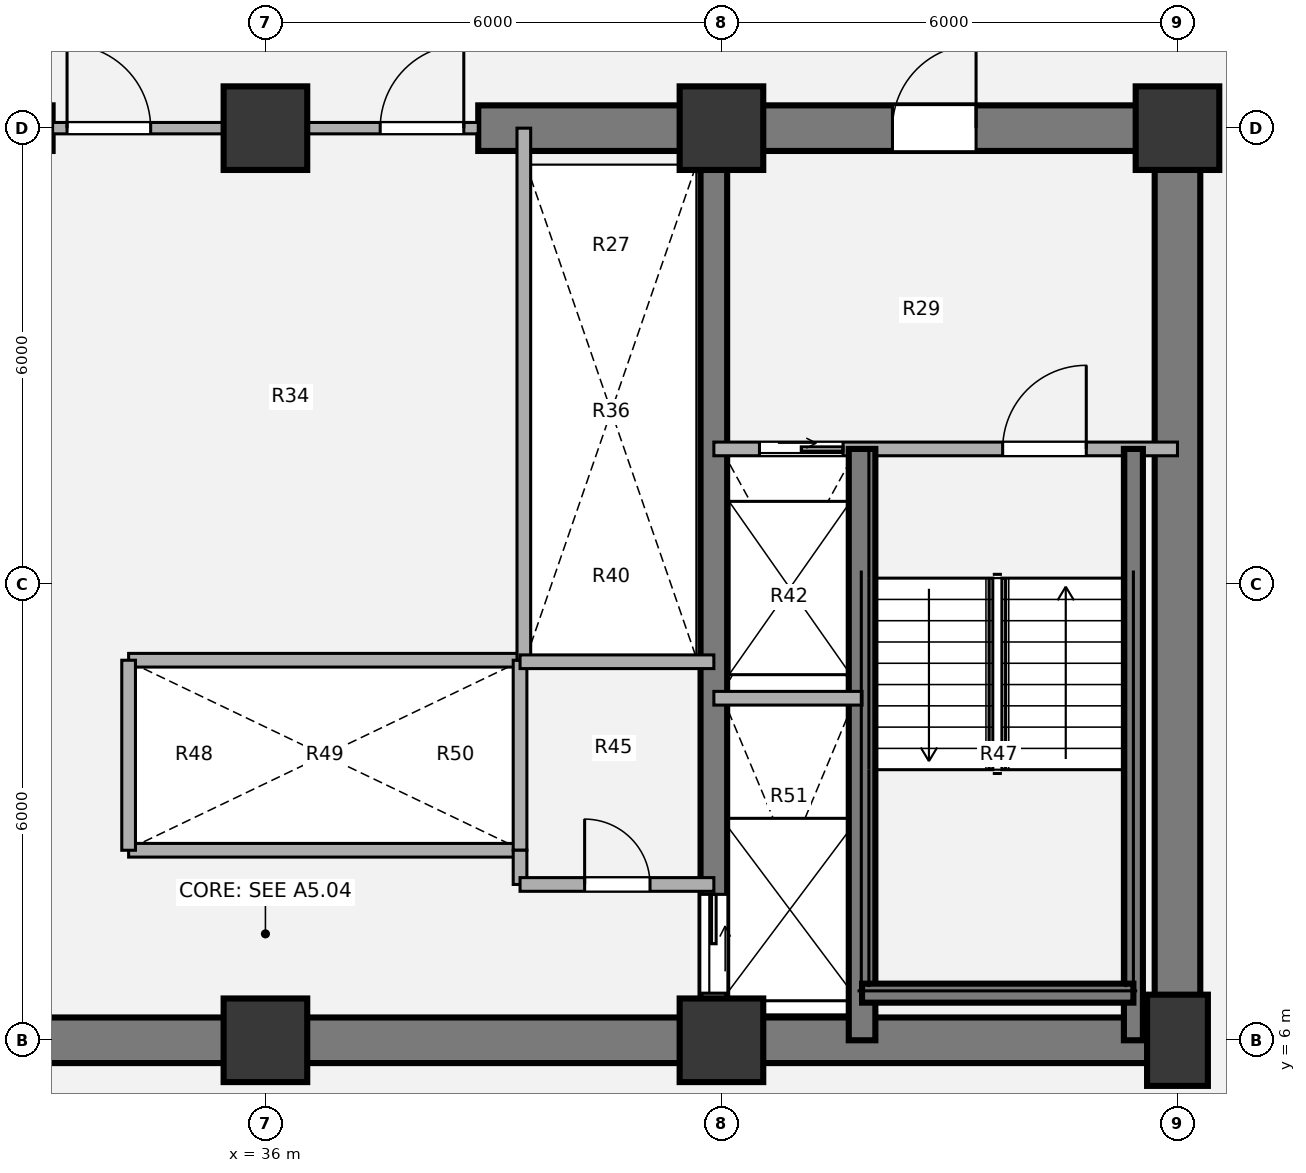
"""IFC4 building model, lengths in metres.
Left out: names, types, materials, properties, quantities, classifications, styles, units other than length and angle.
Written with IfcOpenShell. Run it as: python <this file> out.ifc"""

import sys

from ifc_helpers import new_model, si_unit, direction, frame, frame_2d, origin, origin_2d, place, context, subcontext, project, spatial, rectangle, extrude, source, transform, mapped, element, fill, save


model = new_model("IFC4")
c1 = context("Model", 3, precision=1e-05, world=origin(), true_north=direction((0.0, 1.0)))
c2 = subcontext(c1, "Body", "Model", "MODEL_VIEW")
j1 = project(units=[si_unit("LENGTHUNIT", "METRE"), si_unit("PLANEANGLEUNIT", "RADIAN")], contexts=[c1])
p1 = place(None, origin())
s1 = spatial("IfcSite", under=j1, at=p1, CompositionType="ELEMENT")
p2 = place(p1, origin())
s2 = spatial("IfcBuilding", under=s1, at=p2, CompositionType="ELEMENT")
p3 = place(p2, frame((0.0, 0.0, 34.56)))
s3 = spatial("IfcBuildingStorey", under=s2, at=p3, CompositionType="ELEMENT", Elevation=34.56)
m1 = source(origin(), c2, "Body", "SweptSolid", [
    extrude(rectangle(XDim=1.1, YDim=1.1, at=origin_2d()), origin(), (0.0, 0.0, 1.0), 3.78),
])
for number, where, z_axis, x_axis in (
    (1, (36.0, 6.0, 0.0), (0.0, 0.0, 1.0), (1.0, 0.0, 0.0)),
    (2, (42.0, 6.0, 0.0), (0.0, 0.0, 1.0), (1.0, 0.0, 0.0)),
):
    element("IfcColumn", number, at=place(p3, frame(where, z_axis=z_axis, x_axis=x_axis)), inside=s3, PredefinedType="COLUMN", context=c2, shape_type="MappedRepresentation", body=[
        mapped(m1, transform((0.0, 0.0, 0.0), x_axis=(1.0, 0.0, 0.0), y_axis=(0.0, 1.0, 0.0), z_axis=(0.0, 0.0, 1.0), scale=1.0)),
    ])
m2 = source(origin(), c2, "Body", "SweptSolid", [
    extrude(rectangle(XDim=0.8, YDim=1.2, at=origin_2d()), origin(), (0.0, 0.0, 1.0), 3.78),
])
p4 = place(p3, frame((48.0, 6.0, 0.0), z_axis=(0.0, 0.0, 1.0), x_axis=(1.0, 0.0, 0.0)))
e3 = element("IfcColumn", 3, at=p4, inside=s3, PredefinedType="COLUMN", context=c2, shape_type="MappedRepresentation", body=[
    mapped(m2, transform((0.0, 0.0, 0.0), x_axis=(1.0, 0.0, 0.0), y_axis=(0.0, 1.0, 0.0), z_axis=(0.0, 0.0, 1.0), scale=1.0)),
])
for number, where, z_axis, x_axis in (
    (4, (36.0, 18.0, 0.0), (0.0, 0.0, 1.0), (1.0, 0.0, 0.0)),
    (5, (42.0, 18.0, 0.0), (0.0, 0.0, 1.0), (1.0, 0.0, 0.0)),
    (6, (48.0, 18.0, 0.0), (0.0, 0.0, 1.0), (1.0, 0.0, 0.0)),
):
    element("IfcColumn", number, at=place(p3, frame(where, z_axis=z_axis, x_axis=x_axis)), inside=s3, PredefinedType="COLUMN", context=c2, shape_type="MappedRepresentation", body=[
        mapped(m1, transform((0.0, 0.0, 0.0), x_axis=(1.0, 0.0, 0.0), y_axis=(0.0, 1.0, 0.0), z_axis=(0.0, 0.0, 1.0), scale=1.0)),
    ])
p5 = place(p3, frame((48.3, 6.0, 0.0), z_axis=(0.0, 0.0, 1.0), x_axis=(-1.0, 0.0, 0.0)))
e7 = element("IfcWall", 7, at=p5, inside=s3, PredefinedType="SHEAR", context=c2, shape_type="SweptSolid", body=[
    extrude(rectangle(XDim=24.6, YDim=0.6, at=frame_2d((12.3, 0.0))), origin(), (0.0, 0.0, 1.0), 3.78),
])
p6 = place(p3, frame((48.0, 18.0, 0.0), z_axis=(0.0, 0.0, 1.0), x_axis=(0.0, -1.0, 0.0)))
e8 = element("IfcWall", 8, at=p6, inside=s3, PredefinedType="SHEAR", context=c2, shape_type="SweptSolid", body=[
    extrude(rectangle(XDim=12.0, YDim=0.6, at=frame_2d((6.0, 0.0))), origin(), (0.0, 0.0, 1.0), 3.78),
])
p7 = place(p3, frame((38.8, 18.0, 0.0), z_axis=(0.0, 0.0, 1.0), x_axis=(1.0, 0.0, 0.0)))
e9 = element("IfcWall", 9, at=p7, inside=s3, PredefinedType="SHEAR", context=c2, shape_type="SweptSolid", body=[
    extrude(rectangle(XDim=9.5, YDim=0.6, at=frame_2d((4.75, 0.0))), origin(), (0.0, 0.0, 1.0), 3.78),
])
p8 = place(p7, frame((5.45, 0.0, 0.0)))
e10 = element("IfcOpeningElement", 10, at=p8, cuts=e9, PredefinedType="OPENING", context=c2, shape_type="SweptSolid", body=[
    extrude(rectangle(XDim=1.1, YDim=2.1, at=origin_2d()), frame((0.55, 0.31, 1.05), z_axis=(0.0, -1.0, 0.0), x_axis=(1.0, 0.0, 0.0)), (0.0, 0.0, 1.0), 0.62),
])
p9 = place(p3, frame((41.9, 18.0, 0.0), z_axis=(0.0, 0.0, 1.0), x_axis=(0.0, -1.0, 0.0)))
e11 = element("IfcWall", 11, at=p9, inside=s3, PredefinedType="SHEAR", context=c2, shape_type="SweptSolid", body=[
    extrude(rectangle(XDim=12.0, YDim=0.35, at=frame_2d((6.0, 0.0))), origin(), (0.0, 0.0, 1.0), 3.78),
])
p10 = place(p9, frame((10.08, 0.0, 0.0)))
e12 = element("IfcOpeningElement", 12, at=p10, cuts=e11, PredefinedType="OPENING", context=c2, shape_type="SweptSolid", body=[
    extrude(rectangle(XDim=1.3, YDim=2.1, at=origin_2d()), frame((0.65, 0.185, 1.05), z_axis=(0.0, -1.0, 0.0), x_axis=(1.0, 0.0, 0.0)), (0.0, 0.0, 1.0), 0.37),
])
for number, where, z_axis, x_axis in (
    (13, (34.2, 11.0, 0.0), (0.0, 0.0, 1.0), (1.0, 0.0, 0.0)),
    (14, (34.2, 8.5, 0.0), (0.0, 0.0, 1.0), (1.0, 0.0, 0.0)),
):
    element("IfcWall", number, at=place(p3, frame(where, z_axis=z_axis, x_axis=x_axis)), inside=s3, PredefinedType="PARTITIONING", context=c2, shape_type="SweptSolid", body=[
        extrude(rectangle(XDim=5.15, YDim=0.18, at=frame_2d((2.575, 0.0))), origin(), (0.0, 0.0, 1.0), 3.5),
    ])
for number, where, z_axis, x_axis in (
    (15, (34.2, 8.5, 0.0), (0.0, 0.0, 1.0), (0.0, 1.0, 0.0)),
    (16, (39.35, 8.5, 0.0), (0.0, 0.0, 1.0), (0.0, 1.0, 0.0)),
):
    element("IfcWall", number, at=place(p3, frame(where, z_axis=z_axis, x_axis=x_axis)), inside=s3, PredefinedType="PARTITIONING", context=c2, shape_type="SweptSolid", body=[
        extrude(rectangle(XDim=2.5, YDim=0.18, at=frame_2d((1.25, 0.0))), origin(), (0.0, 0.0, 1.0), 3.5),
    ])
p11 = place(p3, frame((39.4, 11.0, 0.0), z_axis=(0.0, 0.0, 1.0), x_axis=(0.0, 1.0, 0.0)))
e17 = element("IfcWall", 17, at=p11, inside=s3, PredefinedType="PARTITIONING", context=c2, shape_type="SweptSolid", body=[
    extrude(rectangle(XDim=7.0, YDim=0.18, at=frame_2d((3.5, 0.0))), origin(), (0.0, 0.0, 1.0), 3.5),
])
p12 = place(p3, frame((39.35, 10.98, 0.0), z_axis=(0.0, 0.0, 1.0), x_axis=(1.0, 0.0, 0.0)))
e18 = element("IfcWall", 18, at=p12, inside=s3, PredefinedType="PARTITIONING", context=c2, shape_type="SweptSolid", body=[
    extrude(rectangle(XDim=2.55, YDim=0.18, at=frame_2d((1.275, 0.0))), origin(), (0.0, 0.0, 1.0), 3.5),
])
p13 = place(p3, frame((39.35, 8.05, 0.0), z_axis=(0.0, 0.0, 1.0), x_axis=(0.0, 1.0, 0.0)))
e19 = element("IfcWall", 19, at=p13, inside=s3, PredefinedType="PARTITIONING", context=c2, shape_type="SweptSolid", body=[
    extrude(rectangle(XDim=0.45, YDim=0.18, at=frame_2d((0.225, 0.0))), origin(), (0.0, 0.0, 1.0), 3.5),
])
p14 = place(p3, frame((39.35, 8.05, 0.0), z_axis=(0.0, 0.0, 1.0), x_axis=(1.0, 0.0, 0.0)))
e20 = element("IfcWall", 20, at=p14, inside=s3, PredefinedType="PARTITIONING", context=c2, shape_type="SweptSolid", body=[
    extrude(rectangle(XDim=2.55, YDim=0.18, at=frame_2d((1.275, 0.0))), origin(), (0.0, 0.0, 1.0), 3.5),
])
p15 = place(p14, frame((0.85, 0.0, 0.0)))
e21 = element("IfcOpeningElement", 21, at=p15, cuts=e20, PredefinedType="OPENING", context=c2, shape_type="SweptSolid", body=[
    extrude(rectangle(XDim=0.86, YDim=2.1, at=origin_2d()), frame((0.43, 0.1, 1.05), z_axis=(0.0, -1.0, 0.0), x_axis=(1.0, 0.0, 0.0)), (0.0, 0.0, 1.0), 0.2),
])
p16 = place(p3, frame((33.2, 18.0, 0.0), z_axis=(0.0, 0.0, 1.0), x_axis=(1.0, 0.0, 0.0)))
e22 = element("IfcWall", 22, at=p16, inside=s3, PredefinedType="PARTITIONING", context=c2, shape_type="SweptSolid", body=[
    extrude(rectangle(XDim=5.6, YDim=0.15, at=frame_2d((2.8, 0.0))), origin(), (0.0, 0.0, 1.0), 2.315),
])
p17 = place(p16, frame((0.19, 0.0, 0.0)))
e23 = element("IfcOpeningElement", 23, at=p17, cuts=e22, PredefinedType="OPENING", context=c2, shape_type="SweptSolid", body=[
    extrude(rectangle(XDim=1.1, YDim=2.1, at=origin_2d()), frame((0.55, 0.085, 1.05), z_axis=(0.0, -1.0, 0.0), x_axis=(1.0, 0.0, 0.0)), (0.0, 0.0, 1.0), 0.17),
])
p18 = place(p16, frame((4.31, 0.0, 0.0)))
e24 = element("IfcOpeningElement", 24, at=p18, cuts=e22, PredefinedType="OPENING", context=c2, shape_type="SweptSolid", body=[
    extrude(rectangle(XDim=1.1, YDim=2.1, at=origin_2d()), frame((0.55, 0.085, 1.05), z_axis=(0.0, -1.0, 0.0), x_axis=(1.0, 0.0, 0.0)), (0.0, 0.0, 1.0), 0.17),
])
p19 = place(p3, frame((41.9, 13.78, 0.0), z_axis=(0.0, 0.0, 1.0), x_axis=(1.0, 0.0, 0.0)))
e25 = element("IfcWall", 25, at=p19, inside=s3, PredefinedType="PARTITIONING", context=c2, shape_type="SweptSolid", body=[
    extrude(rectangle(XDim=6.1, YDim=0.18, at=frame_2d((3.05, 0.0))), origin(), (0.0, 0.0, 1.0), 3.5),
])
p20 = place(p19, frame((0.6, 0.0, 0.0)))
e26 = element("IfcOpeningElement", 26, at=p20, cuts=e25, PredefinedType="OPENING", context=c2, shape_type="SweptSolid", body=[
    extrude(rectangle(XDim=1.1, YDim=2.1, at=origin_2d()), frame((0.55, 0.1, 1.05), z_axis=(0.0, -1.0, 0.0), x_axis=(1.0, 0.0, 0.0)), (0.0, 0.0, 1.0), 0.2),
])
p21 = place(p19, frame((3.8, 0.0, 0.0)))
e27 = element("IfcOpeningElement", 27, at=p21, cuts=e25, PredefinedType="OPENING", context=c2, shape_type="SweptSolid", body=[
    extrude(rectangle(XDim=1.1, YDim=2.1, at=origin_2d()), frame((0.55, 0.1, 1.05), z_axis=(0.0, -1.0, 0.0), x_axis=(1.0, 0.0, 0.0)), (0.0, 0.0, 1.0), 0.2),
])
p22 = place(p3, frame((43.85, 6.0, 0.0), z_axis=(0.0, 0.0, 1.0), x_axis=(0.0, 1.0, 0.0)))
e28 = element("IfcWall", 28, at=p22, inside=s3, PredefinedType="SHEAR", context=c2, shape_type="SweptSolid", body=[
    extrude(rectangle(XDim=7.78, YDim=0.35, at=frame_2d((3.89, 0.0))), origin(), (0.0, 0.0, 1.0), 3.85),
])
p23 = place(p3, frame((47.42, 6.0, 0.0), z_axis=(0.0, 0.0, 1.0), x_axis=(0.0, 1.0, 0.0)))
e29 = element("IfcWall", 29, at=p23, inside=s3, PredefinedType="SHEAR", context=c2, shape_type="SweptSolid", body=[
    extrude(rectangle(XDim=7.78, YDim=0.25, at=frame_2d((3.89, 0.0))), origin(), (0.0, 0.0, 1.0), 3.85),
])
p24 = place(p3, frame((43.85, 6.62, 0.0), z_axis=(0.0, 0.0, 1.0), x_axis=(1.0, 0.0, 0.0)))
e30 = element("IfcWall", 30, at=p24, inside=s3, PredefinedType="SHEAR", context=c2, shape_type="SweptSolid", body=[
    extrude(rectangle(XDim=3.57, YDim=0.25, at=frame_2d((1.785, 0.0))), origin(), (0.0, 0.0, 1.0), 3.85),
])
p25 = place(p3, frame((41.9, 10.5, 0.0), z_axis=(0.0, 0.0, 1.0), x_axis=(1.0, 0.0, 0.0)))
e31 = element("IfcWall", 31, at=p25, inside=s3, PredefinedType="PARTITIONING", context=c2, shape_type="SweptSolid", body=[
    extrude(rectangle(XDim=1.95, YDim=0.18, at=frame_2d((0.975, 0.0))), origin(), (0.0, 0.0, 1.0), 3.5),
])
m3 = source(origin(), c2, "Body", "SweptSolid", [
    extrude(rectangle(XDim=0.86, YDim=2.1, at=origin_2d()), frame((0.43, 0.025, 1.05), z_axis=(0.0, -1.0, 0.0), x_axis=(1.0, 0.0, 0.0)), (0.0, 0.0, 1.0), 0.05),
])
p26 = place(p15, origin())
e32 = element("IfcDoor", 32, at=p26, inside=s3, OperationType="SINGLE_SWING_LEFT", PredefinedType="DOOR", context=c2, shape_type="MappedRepresentation", body=[
    mapped(m3, transform((0.0, 0.0, 0.0), x_axis=(1.0, 0.0, 0.0), y_axis=(0.0, 1.0, 0.0), z_axis=(0.0, 0.0, 1.0), scale=1.0)),
])
fill(e21, e32)
m4 = source(origin(), c2, "Body", "SweptSolid", [
    extrude(rectangle(XDim=1.1, YDim=2.1, at=origin_2d()), frame((0.55, 0.025, 1.05), z_axis=(0.0, -1.0, 0.0), x_axis=(1.0, 0.0, 0.0)), (0.0, 0.0, 1.0), 0.05),
])
p27 = place(p17, origin())
e33 = element("IfcDoor", 33, at=p27, inside=s3, OperationType="SINGLE_SWING_LEFT", PredefinedType="DOOR", context=c2, shape_type="MappedRepresentation", body=[
    mapped(m4, transform((0.0, 0.0, 0.0), x_axis=(1.0, 0.0, 0.0), y_axis=(0.0, 1.0, 0.0), z_axis=(0.0, 0.0, 1.0), scale=1.0)),
])
fill(e23, e33)
p28 = place(p18, origin())
e34 = element("IfcDoor", 34, at=p28, inside=s3, OperationType="SINGLE_SWING_RIGHT", PredefinedType="DOOR", context=c2, shape_type="MappedRepresentation", body=[
    mapped(m4, transform((0.0, 0.0, 0.0), x_axis=(1.0, 0.0, 0.0), y_axis=(0.0, 1.0, 0.0), z_axis=(0.0, 0.0, 1.0), scale=1.0)),
])
fill(e24, e34)
m5 = source(origin(), c2, "Body", "SweptSolid", [
    extrude(rectangle(XDim=1.1, YDim=2.1, at=origin_2d()), frame((0.55, 0.025, 1.05), z_axis=(0.0, -1.0, 0.0), x_axis=(1.0, 0.0, 0.0)), (0.0, 0.0, 1.0), 0.05),
])
p29 = place(p20, origin())
e35 = element("IfcDoor", 35, at=p29, inside=s3, OperationType="SLIDING_TO_RIGHT", PredefinedType="DOOR", context=c2, shape_type="MappedRepresentation", body=[
    mapped(m5, transform((0.0, 0.0, 0.0), x_axis=(1.0, 0.0, 0.0), y_axis=(0.0, 1.0, 0.0), z_axis=(0.0, 0.0, 1.0), scale=1.0)),
])
fill(e26, e35)
m6 = source(origin(), c2, "Body", "SweptSolid", [
    extrude(rectangle(XDim=1.1, YDim=2.1, at=origin_2d()), frame((0.55, 0.025, 1.05), z_axis=(0.0, -1.0, 0.0), x_axis=(1.0, 0.0, 0.0)), (0.0, 0.0, 1.0), 0.05),
])
p30 = place(p21, origin())
e36 = element("IfcDoor", 36, at=p30, inside=s3, OperationType="SINGLE_SWING_RIGHT", PredefinedType="DOOR", context=c2, shape_type="MappedRepresentation", body=[
    mapped(m6, transform((0.0, 0.0, 0.0), x_axis=(1.0, 0.0, 0.0), y_axis=(0.0, 1.0, 0.0), z_axis=(0.0, 0.0, 1.0), scale=1.0)),
])
fill(e27, e36)
m7 = source(origin(), c2, "Body", "SweptSolid", [
    extrude(rectangle(XDim=1.3, YDim=2.1, at=origin_2d()), frame((0.65, 0.025, 1.05), z_axis=(0.0, -1.0, 0.0), x_axis=(1.0, 0.0, 0.0)), (0.0, 0.0, 1.0), 0.05),
])
p31 = place(p10, origin())
e37 = element("IfcDoor", 37, at=p31, inside=s3, OperationType="SLIDING_TO_LEFT", PredefinedType="DOOR", context=c2, shape_type="MappedRepresentation", body=[
    mapped(m7, transform((0.0, 0.0, 0.0), x_axis=(1.0, 0.0, 0.0), y_axis=(0.0, 1.0, 0.0), z_axis=(0.0, 0.0, 1.0), scale=1.0)),
])
fill(e12, e37)
p32 = place(p8, origin())
e38 = element("IfcDoor", 38, at=p32, inside=s3, OperationType="SINGLE_SWING_RIGHT", PredefinedType="DOOR", context=c2, shape_type="MappedRepresentation", body=[
    mapped(m4, transform((0.0, 0.0, 0.0), x_axis=(1.0, 0.0, 0.0), y_axis=(0.0, 1.0, 0.0), z_axis=(0.0, 0.0, 1.0), scale=1.0)),
])
fill(e10, e38)
save(model, sys.argv[1])
